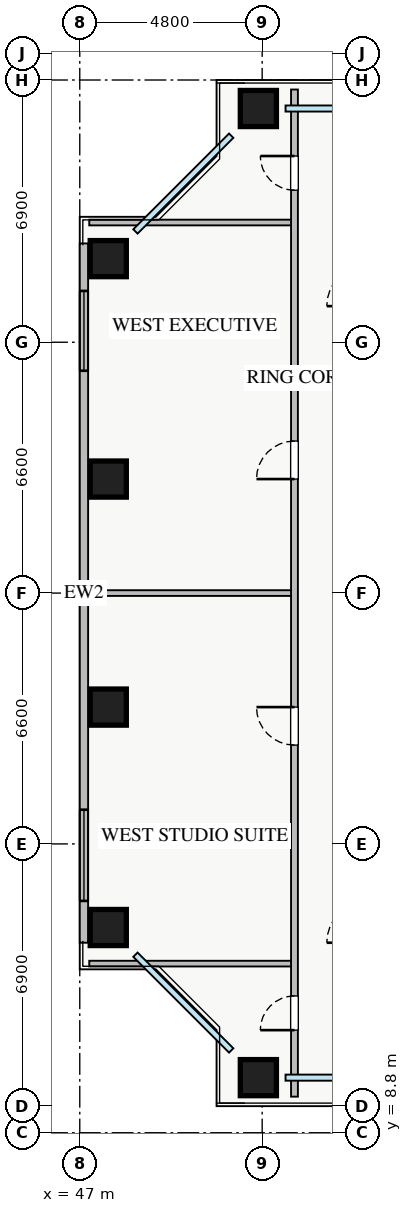
"""IFC4 building model, lengths in metres.
Left out: names, types, materials, properties, quantities, classifications, styles, units other than length and angle.
Written with IfcOpenShell. Run it as: python <this file> out.ifc"""

import sys

from ifc_helpers import new_model, si_unit, direction, frame, frame_2d, origin, origin_2d, place, context, subcontext, project, spatial, rectangle, extrude, source, transform, mapped, element, fill, save


model = new_model("IFC4")
c1 = context("Model", 3, precision=1e-05, world=origin(), true_north=direction((0.0, 1.0)))
c2 = subcontext(c1, "Body", "Model", "MODEL_VIEW")
j1 = project(units=[si_unit("LENGTHUNIT", "METRE"), si_unit("PLANEANGLEUNIT", "RADIAN")], contexts=[c1])
p1 = place(None, origin())
s1 = spatial("IfcSite", under=j1, at=p1, CompositionType="ELEMENT")
p2 = place(p1, origin())
s2 = spatial("IfcBuilding", under=s1, at=p2, CompositionType="ELEMENT")
p3 = place(p2, frame((0.0, 0.0, 66.5)))
s3 = spatial("IfcBuildingStorey", under=s2, at=p3, CompositionType="ELEMENT", Elevation=66.5)
m1 = source(origin(), c2, "Body", "SweptSolid", [
    extrude(rectangle(XDim=0.95, YDim=0.95, at=origin_2d()), origin(), (0.0, 0.0, 1.0), 3.25),
])
for number, where, z_axis, x_axis in (
    (1, (51.7, 10.25, 0.0), (0.0, 0.0, 1.0), (1.0, 0.0, 0.0)),
    (2, (51.7, 35.75, 0.0), (0.0, 0.0, 1.0), (1.0, 0.0, 0.0)),
    (3, (47.75, 14.2, 0.0), (0.0, 0.0, 1.0), (1.0, 0.0, 0.0)),
    (4, (47.75, 20.0, 0.0), (0.0, 0.0, 1.0), (1.0, 0.0, 0.0)),
    (5, (47.75, 26.0, 0.0), (0.0, 0.0, 1.0), (1.0, 0.0, 0.0)),
    (6, (47.75, 31.8, 0.0), (0.0, 0.0, 1.0), (1.0, 0.0, 0.0)),
):
    element("IfcColumn", number, at=place(p3, frame(where, z_axis=z_axis, x_axis=x_axis)), inside=s3, PredefinedType="COLUMN", context=c2, shape_type="MappedRepresentation", body=[
        mapped(m1, transform((0.0, 0.0, 0.0), x_axis=(1.0, 0.0, 0.0), y_axis=(0.0, 1.0, 0.0), z_axis=(0.0, 0.0, 1.0), scale=1.0)),
    ])
p4 = place(p3, frame((47.11, 13.8, 0.0), z_axis=(0.0, 0.0, 1.0), x_axis=(0.0, 1.0, 0.0)))
e7 = element("IfcWall", 7, at=p4, inside=s3, PredefinedType="STANDARD", context=c2, shape_type="SweptSolid", body=[
    extrude(rectangle(XDim=18.4, YDim=0.22, at=frame_2d((9.2, 0.0))), origin(), (0.0, 0.0, 1.0), 2.61),
])
p5 = place(p4, frame((1.1, 0.0, 0.9)))
e8 = element("IfcOpeningElement", 8, at=p5, cuts=e7, PredefinedType="OPENING", context=c2, shape_type="SweptSolid", body=[
    extrude(rectangle(XDim=2.4, YDim=1.48, at=frame_2d((1.2, 0.74))), frame((0.0, 0.12, 0.0), z_axis=(0.0, -1.0, 0.0), x_axis=(1.0, 0.0, 0.0)), (0.0, 0.0, 1.0), 0.24),
])
p6 = place(p4, frame((15.05, 0.0, 0.9)))
e9 = element("IfcOpeningElement", 9, at=p6, cuts=e7, PredefinedType="OPENING", context=c2, shape_type="SweptSolid", body=[
    extrude(rectangle(XDim=2.1, YDim=1.48, at=frame_2d((1.05, 0.74))), frame((0.0, 0.12, 0.0), z_axis=(0.0, -1.0, 0.0), x_axis=(1.0, 0.0, 0.0)), (0.0, 0.0, 1.0), 0.24),
])
for number, where, z_axis, x_axis in (
    (10, (47.25, 32.75, 0.0), (0.0, 0.0, 1.0), (1.0, 0.0, 0.0)),
    (11, (47.25, 13.25, 0.0), (0.0, 0.0, 1.0), (1.0, 0.0, 0.0)),
):
    element("IfcWall", number, at=place(p3, frame(where, z_axis=z_axis, x_axis=x_axis)), inside=s3, PredefinedType="PARTITIONING", context=c2, shape_type="SweptSolid", body=[
        extrude(rectangle(XDim=5.4, YDim=0.15, at=frame_2d((2.7, 0.0))), origin(), (0.0, 0.0, 1.0), 3.07),
    ])
p7 = place(p3, frame((47.25, 23.0, 0.0), z_axis=(0.0, 0.0, 1.0), x_axis=(1.0, 0.0, 0.0)))
e12 = element("IfcWall", 12, at=p7, inside=s3, PredefinedType="PARTITIONING", context=c2, shape_type="SweptSolid", body=[
    extrude(rectangle(XDim=5.4, YDim=0.15, at=frame_2d((2.7, 0.0))), origin(), (0.0, 0.0, 1.0), 2.815),
])
p8 = place(p3, frame((52.65, 9.75, 0.0), z_axis=(0.0, 0.0, 1.0), x_axis=(0.0, 1.0, 0.0)))
e13 = element("IfcWall", 13, at=p8, inside=s3, PredefinedType="PARTITIONING", context=c2, shape_type="SweptSolid", body=[
    extrude(rectangle(XDim=26.5, YDim=0.18, at=frame_2d((13.25, 0.0))), origin(), (0.0, 0.0, 1.0), 2.215),
])
p9 = place(p8, frame((23.85, 0.0, 0.0)))
e14 = element("IfcOpeningElement", 14, at=p9, cuts=e13, PredefinedType="OPENING", context=c2, shape_type="SweptSolid", body=[
    extrude(rectangle(XDim=0.9, YDim=2.05, at=frame_2d((0.45, 1.025))), frame((0.0, 0.1, 0.0), z_axis=(0.0, -1.0, 0.0), x_axis=(1.0, 0.0, 0.0)), (0.0, 0.0, 1.0), 0.2),
])
p10 = place(p8, frame((1.75, 0.0, 0.0)))
e15 = element("IfcOpeningElement", 15, at=p10, cuts=e13, PredefinedType="OPENING", context=c2, shape_type="SweptSolid", body=[
    extrude(rectangle(XDim=0.9, YDim=2.05, at=frame_2d((0.45, 1.025))), frame((0.0, 0.1, 0.0), z_axis=(0.0, -1.0, 0.0), x_axis=(1.0, 0.0, 0.0)), (0.0, 0.0, 1.0), 0.2),
])
p11 = place(p8, frame((9.25, 0.0, 0.0)))
e16 = element("IfcOpeningElement", 16, at=p11, cuts=e13, PredefinedType="OPENING", context=c2, shape_type="SweptSolid", body=[
    extrude(rectangle(XDim=1.0, YDim=2.05, at=frame_2d((0.5, 1.025))), frame((0.0, 0.1, 0.0), z_axis=(0.0, -1.0, 0.0), x_axis=(1.0, 0.0, 0.0)), (0.0, 0.0, 1.0), 0.2),
])
p12 = place(p8, frame((16.25, 0.0, 0.0)))
e17 = element("IfcOpeningElement", 17, at=p12, cuts=e13, PredefinedType="OPENING", context=c2, shape_type="SweptSolid", body=[
    extrude(rectangle(XDim=1.0, YDim=2.05, at=frame_2d((0.5, 1.025))), frame((0.0, 0.1, 0.0), z_axis=(0.0, -1.0, 0.0), x_axis=(1.0, 0.0, 0.0)), (0.0, 0.0, 1.0), 0.2),
])
m2 = source(origin(), c2, "Body", "SweptSolid", [
    extrude(rectangle(XDim=2.4, YDim=1.48, at=frame_2d((1.2, 0.74))), frame((0.0, 0.03, 0.0), z_axis=(0.0, -1.0, 0.0), x_axis=(1.0, 0.0, 0.0)), (0.0, 0.0, 1.0), 0.06),
])
p13 = place(p5, origin())
e18 = element("IfcWindow", 18, at=p13, inside=s3, PartitioningType="TRIPLE_PANEL_VERTICAL", PredefinedType="WINDOW", context=c2, shape_type="MappedRepresentation", body=[
    mapped(m2, transform((0.0, 0.0, 0.0), x_axis=(1.0, 0.0, 0.0), y_axis=(0.0, 1.0, 0.0), z_axis=(0.0, 0.0, 1.0), scale=1.0)),
])
fill(e8, e18)
m3 = source(origin(), c2, "Body", "SweptSolid", [
    extrude(rectangle(XDim=2.1, YDim=1.48, at=frame_2d((1.05, 0.74))), frame((0.0, 0.03, 0.0), z_axis=(0.0, -1.0, 0.0), x_axis=(1.0, 0.0, 0.0)), (0.0, 0.0, 1.0), 0.06),
])
p14 = place(p6, origin())
e19 = element("IfcWindow", 19, at=p14, inside=s3, PartitioningType="TRIPLE_PANEL_VERTICAL", PredefinedType="WINDOW", context=c2, shape_type="MappedRepresentation", body=[
    mapped(m3, transform((0.0, 0.0, 0.0), x_axis=(1.0, 0.0, 0.0), y_axis=(0.0, 1.0, 0.0), z_axis=(0.0, 0.0, 1.0), scale=1.0)),
])
fill(e9, e19)
m4 = source(origin(), c2, "Body", "SweptSolid", [
    extrude(rectangle(XDim=0.9, YDim=2.05, at=frame_2d((0.45, 1.025))), frame((0.0, 0.025, 0.0), z_axis=(0.0, -1.0, 0.0), x_axis=(1.0, 0.0, 0.0)), (0.0, 0.0, 1.0), 0.05),
])
p15 = place(p9, origin())
e20 = element("IfcDoor", 20, at=p15, inside=s3, OperationType="SINGLE_SWING_RIGHT", PredefinedType="DOOR", context=c2, shape_type="MappedRepresentation", body=[
    mapped(m4, transform((0.0, 0.0, 0.0), x_axis=(1.0, 0.0, 0.0), y_axis=(0.0, 1.0, 0.0), z_axis=(0.0, 0.0, 1.0), scale=1.0)),
])
fill(e14, e20)
p16 = place(p10, origin())
e21 = element("IfcDoor", 21, at=p16, inside=s3, OperationType="SINGLE_SWING_LEFT", PredefinedType="DOOR", context=c2, shape_type="MappedRepresentation", body=[
    mapped(m4, transform((0.0, 0.0, 0.0), x_axis=(1.0, 0.0, 0.0), y_axis=(0.0, 1.0, 0.0), z_axis=(0.0, 0.0, 1.0), scale=1.0)),
])
fill(e15, e21)
m5 = source(origin(), c2, "Body", "SweptSolid", [
    extrude(rectangle(XDim=1.0, YDim=2.05, at=frame_2d((0.5, 1.025))), frame((0.0, 0.025, 0.0), z_axis=(0.0, -1.0, 0.0), x_axis=(1.0, 0.0, 0.0)), (0.0, 0.0, 1.0), 0.05),
])
p17 = place(p11, origin())
e22 = element("IfcDoor", 22, at=p17, inside=s3, OperationType="SINGLE_SWING_RIGHT", PredefinedType="DOOR", context=c2, shape_type="MappedRepresentation", body=[
    mapped(m5, transform((0.0, 0.0, 0.0), x_axis=(1.0, 0.0, 0.0), y_axis=(0.0, 1.0, 0.0), z_axis=(0.0, 0.0, 1.0), scale=1.0)),
])
fill(e16, e22)
p18 = place(p12, origin())
e23 = element("IfcDoor", 23, at=p18, inside=s3, OperationType="SINGLE_SWING_LEFT", PredefinedType="DOOR", context=c2, shape_type="MappedRepresentation", body=[
    mapped(m5, transform((0.0, 0.0, 0.0), x_axis=(1.0, 0.0, 0.0), y_axis=(0.0, 1.0, 0.0), z_axis=(0.0, 0.0, 1.0), scale=1.0)),
])
fill(e17, e23)
save(model, sys.argv[1])
